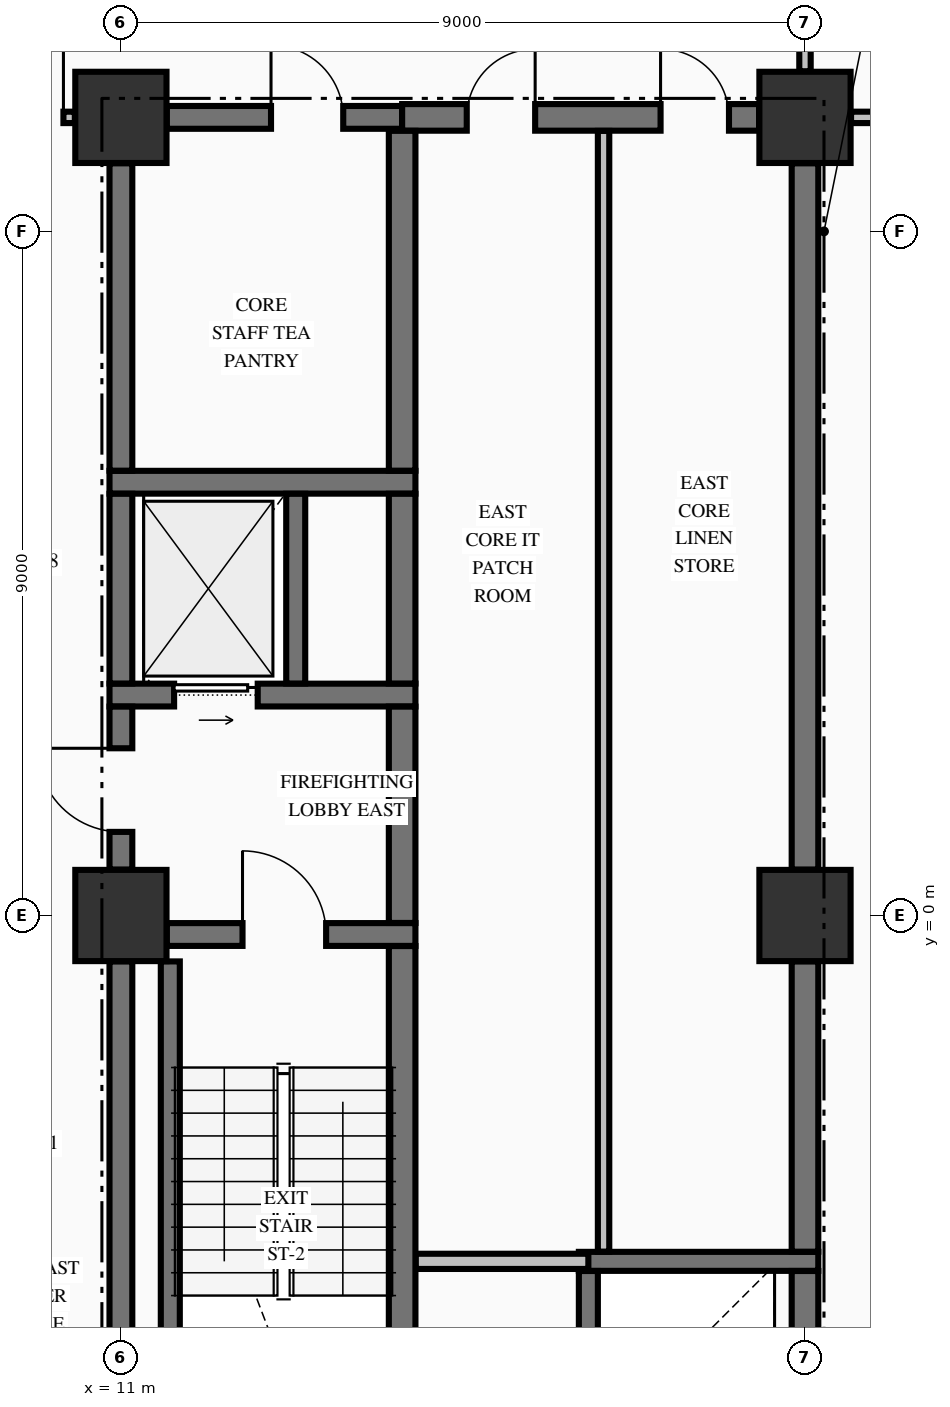
"""IFC4 building model, lengths in metres.
Left out: names, types, materials, properties, quantities, classifications, styles, units other than length and angle.
Written with IfcOpenShell. Run it as: python <this file> out.ifc"""

import sys

from ifc_helpers import new_model, si_unit, direction, frame, frame_2d, origin, origin_2d, place, context, subcontext, project, spatial, rectangle, extrude, element, fill, save


model = new_model("IFC4")
c1 = context("Model", 3, precision=1e-05, world=origin(), true_north=direction((0.0, 1.0)))
c2 = subcontext(c1, "Body", "Model", "MODEL_VIEW")
j1 = project(units=[si_unit("LENGTHUNIT", "METRE"), si_unit("PLANEANGLEUNIT", "RADIAN")], contexts=[c1])
p1 = place(None, origin())
s1 = spatial("IfcSite", under=j1, at=p1, CompositionType="ELEMENT")
p2 = place(p1, origin())
s2 = spatial("IfcBuilding", under=s1, at=p2, CompositionType="ELEMENT")
p3 = place(p2, frame((0.0, 0.0, 64.33)))
s3 = spatial("IfcBuildingStorey", under=s2, at=p3, CompositionType="ELEMENT", Elevation=64.33)
for number, where, z_axis, x_axis in (
    (1, (11.0, 0.0, -0.25), (0.0, 0.0, 1.0), (1.0, 0.0, 0.0)),
    (2, (11.0, 10.5, -0.25), (0.0, 0.0, 1.0), (1.0, 0.0, 0.0)),
    (3, (20.0, 10.5, -0.25), (0.0, 0.0, 1.0), (1.0, 0.0, 0.0)),
    (4, (20.0, 0.0, -0.25), (0.0, 0.0, 1.0), (1.0, 0.0, 0.0)),
):
    element("IfcColumn", number, at=place(p3, frame(where, z_axis=z_axis, x_axis=x_axis)), inside=s3, PredefinedType="COLUMN", context=c2, shape_type="SweptSolid", body=[
        extrude(rectangle(XDim=1.2, YDim=1.2, at=origin_2d()), origin(), (0.0, 0.0, 1.0), 3.57),
    ])
p4 = place(p3, frame((17.025, -4.55, 0.0), z_axis=(0.0, 0.0, 1.0), x_axis=(1.0, 0.0, 0.0)))
e5 = element("IfcWall", 5, at=p4, inside=s3, PredefinedType="SOLIDWALL", context=c2, shape_type="SweptSolid", body=[
    extrude(rectangle(XDim=3.15, YDim=0.25, at=frame_2d((1.575, 0.0))), origin(), (0.0, 0.0, 1.0), 3.32),
])
p5 = place(p3, frame((11.604, -0.25, 0.0), z_axis=(0.0, 0.0, 1.0), x_axis=(1.0, 0.0, 0.0)))
e6 = element("IfcWall", 6, at=p5, inside=s3, PredefinedType="SHEAR", context=c2, shape_type="SweptSolid", body=[
    extrude(rectangle(XDim=3.271, YDim=0.3, at=frame_2d((1.635, 0.0))), origin(), (0.0, 0.0, 1.0), 3.32),
])
p6 = place(p5, frame((0.996, 0.0, 0.0)))
e7 = element("IfcOpeningElement", 7, at=p6, cuts=e6, PredefinedType="OPENING", context=c2, shape_type="SweptSolid", body=[
    extrude(rectangle(XDim=1.1, YDim=2.15, at=frame_2d((0.55, 1.075))), frame((0.0, 0.16, 0.0), z_axis=(0.0, -1.0, 0.0), x_axis=(1.0, 0.0, 0.0)), (0.0, 0.0, 1.0), 0.32),
])
p7 = place(p3, frame((10.85, 2.9, 0.0), z_axis=(0.0, 0.0, 1.0), x_axis=(1.0, 0.0, 0.0)))
e8 = element("IfcWall", 8, at=p7, inside=s3, PredefinedType="SHEAR", context=c2, shape_type="SweptSolid", body=[
    extrude(rectangle(XDim=4.025, YDim=0.3, at=frame_2d((2.012, 0.0))), origin(), (0.0, 0.0, 1.0), 3.32),
])
p8 = place(p7, frame((0.85, 0.0, 0.0)))
e9 = element("IfcOpeningElement", 9, at=p8, cuts=e8, PredefinedType="OPENING", context=c2, shape_type="SweptSolid", body=[
    extrude(rectangle(XDim=1.1, YDim=2.2, at=frame_2d((0.55, 1.1))), frame((0.0, 0.16, 0.0), z_axis=(0.0, -1.0, 0.0), x_axis=(1.0, 0.0, 0.0)), (0.0, 0.0, 1.0), 0.32),
])
p9 = place(p3, frame((10.85, 5.7, 0.0), z_axis=(0.0, 0.0, 1.0), x_axis=(1.0, 0.0, 0.0)))
e10 = element("IfcWall", 10, at=p9, inside=s3, PredefinedType="SHEAR", context=c2, shape_type="SweptSolid", body=[
    extrude(rectangle(XDim=4.025, YDim=0.3, at=frame_2d((2.012, 0.0))), origin(), (0.0, 0.0, 1.0), 3.32),
])
p10 = place(p3, frame((11.604, 10.5, 0.0), z_axis=(0.0, 0.0, 1.0), x_axis=(1.0, 0.0, 0.0)))
e11 = element("IfcWall", 11, at=p10, inside=s3, PredefinedType="SHEAR", context=c2, shape_type="SweptSolid", body=[
    extrude(rectangle(XDim=3.096, YDim=0.3, at=frame_2d((1.548, 0.0))), origin(), (0.0, 0.0, 1.0), 3.32),
])
p11 = place(p10, frame((1.371, 0.0, 0.0)))
e12 = element("IfcOpeningElement", 12, at=p11, cuts=e11, PredefinedType="OPENING", context=c2, shape_type="SweptSolid", body=[
    extrude(rectangle(XDim=0.95, YDim=2.15, at=frame_2d((0.475, 1.075))), frame((0.0, 0.16, 0.0), z_axis=(0.0, -1.0, 0.0), x_axis=(1.0, 0.0, 0.0)), (0.0, 0.0, 1.0), 0.32),
])
p12 = place(p3, frame((14.7, 10.5, 0.0), z_axis=(0.0, 0.0, 1.0), x_axis=(1.0, 0.0, 0.0)))
e13 = element("IfcWall", 13, at=p12, inside=s3, PredefinedType="SHEAR", context=c2, shape_type="SweptSolid", body=[
    extrude(rectangle(XDim=4.696, YDim=0.35, at=frame_2d((2.348, 0.0))), origin(), (0.0, 0.0, 1.0), 3.32),
])
p13 = place(p12, frame((0.85, 0.0, 0.0)))
e14 = element("IfcOpeningElement", 14, at=p13, cuts=e13, PredefinedType="OPENING", context=c2, shape_type="SweptSolid", body=[
    extrude(rectangle(XDim=0.9, YDim=2.15, at=frame_2d((0.45, 1.075))), frame((0.0, 0.185, 0.0), z_axis=(0.0, -1.0, 0.0), x_axis=(1.0, 0.0, 0.0)), (0.0, 0.0, 1.0), 0.37),
])
p14 = place(p12, frame((3.4, 0.0, 0.0)))
e15 = element("IfcOpeningElement", 15, at=p14, cuts=e13, PredefinedType="OPENING", context=c2, shape_type="SweptSolid", body=[
    extrude(rectangle(XDim=0.9, YDim=2.15, at=frame_2d((0.45, 1.075))), frame((0.0, 0.185, 0.0), z_axis=(0.0, -1.0, 0.0), x_axis=(1.0, 0.0, 0.0)), (0.0, 0.0, 1.0), 0.37),
])
p15 = place(p3, frame((14.878, -4.55, 0.0), z_axis=(0.0, 0.0, 1.0), x_axis=(1.0, 0.0, 0.0)))
e16 = element("IfcWall", 16, at=p15, inside=s3, PredefinedType="PARTITIONING", context=c2, shape_type="SweptSolid", body=[
    extrude(rectangle(XDim=2.272, YDim=0.2, at=frame_2d((1.136, 0.0))), origin(), (0.0, 0.0, 1.0), 3.32),
])
p16 = place(p3, frame((-10.394, 10.5, 0.0), z_axis=(0.0, 0.0, 1.0), x_axis=(1.0, 0.0, 0.0)))
e17 = element("IfcWall", 17, at=p16, inside=s3, PredefinedType="PARTITIONING", context=c2, shape_type="SweptSolid", body=[
    extrude(rectangle(XDim=20.788, YDim=0.15, at=frame_2d((10.394, 0.0))), origin(), (0.0, 0.0, 1.0), 3.32),
])
p17 = place(p16, frame((0.15, 0.0, 0.0)))
e18 = element("IfcOpeningElement", 18, at=p17, cuts=e17, PredefinedType="OPENING", context=c2, shape_type="SweptSolid", body=[
    extrude(rectangle(XDim=1.05, YDim=2.15, at=frame_2d((0.525, 1.075))), frame((0.0, 0.085, 0.0), z_axis=(0.0, -1.0, 0.0), x_axis=(1.0, 0.0, 0.0)), (0.0, 0.0, 1.0), 0.17),
])
p18 = place(p16, frame((19.588, 0.0, 0.0)))
e19 = element("IfcOpeningElement", 19, at=p18, cuts=e17, PredefinedType="OPENING", context=c2, shape_type="SweptSolid", body=[
    extrude(rectangle(XDim=1.05, YDim=2.15, at=frame_2d((0.525, 1.075))), frame((0.0, 0.085, 0.0), z_axis=(0.0, -1.0, 0.0), x_axis=(1.0, 0.0, 0.0)), (0.0, 0.0, 1.0), 0.17),
])
p19 = place(p3, frame((20.606, 10.5, 0.0), z_axis=(0.0, 0.0, 1.0), x_axis=(1.0, 0.0, 0.0)))
e20 = element("IfcWall", 20, at=p19, inside=s3, PredefinedType="PARTITIONING", context=c2, shape_type="SweptSolid", body=[
    extrude(rectangle(XDim=3.229, YDim=0.15, at=frame_2d((1.615, 0.0))), origin(), (0.0, 0.0, 1.0), 3.32),
])
p20 = place(p19, frame((0.894, 0.0, 0.0)))
e21 = element("IfcOpeningElement", 21, at=p20, cuts=e20, PredefinedType="OPENING", context=c2, shape_type="SweptSolid", body=[
    extrude(rectangle(XDim=1.0, YDim=2.15, at=frame_2d((0.5, 1.075))), frame((0.0, 0.085, 0.0), z_axis=(0.0, -1.0, 0.0), x_axis=(1.0, 0.0, 0.0)), (0.0, 0.0, 1.0), 0.17),
])
p21 = place(p3, frame((11.0, -9.346, 0.0), z_axis=(0.0, 0.0, 1.0), x_axis=(0.0, 1.0, 0.0)))
e22 = element("IfcWall", 22, at=p21, inside=s3, PredefinedType="SHEAR", context=c2, shape_type="SweptSolid", body=[
    extrude(rectangle(XDim=8.742, YDim=0.3, at=frame_2d((4.371, 0.0))), origin(), (0.0, 0.0, 1.0), 3.32),
])
p22 = place(p3, frame((11.0, 0.604, 0.0), z_axis=(0.0, 0.0, 1.0), x_axis=(0.0, 1.0, 0.0)))
e23 = element("IfcWall", 23, at=p22, inside=s3, PredefinedType="SHEAR", context=c2, shape_type="SweptSolid", body=[
    extrude(rectangle(XDim=2.144, YDim=0.3, at=frame_2d((1.072, 0.0))), origin(), (0.0, 0.0, 1.0), 3.32),
])
p23 = place(p22, frame((0.496, 0.0, 0.0)))
e24 = element("IfcOpeningElement", 24, at=p23, cuts=e23, PredefinedType="OPENING", context=c2, shape_type="SweptSolid", body=[
    extrude(rectangle(XDim=1.1, YDim=2.15, at=frame_2d((0.55, 1.075))), frame((0.0, 0.16, 0.0), z_axis=(0.0, -1.0, 0.0), x_axis=(1.0, 0.0, 0.0)), (0.0, 0.0, 1.0), 0.32),
])
p24 = place(p3, frame((11.0, 3.052, 0.0), z_axis=(0.0, 0.0, 1.0), x_axis=(0.0, 1.0, 0.0)))
e25 = element("IfcWall", 25, at=p24, inside=s3, PredefinedType="SHEAR", context=c2, shape_type="SweptSolid", body=[
    extrude(rectangle(XDim=2.496, YDim=0.3, at=frame_2d((1.248, 0.0))), origin(), (0.0, 0.0, 1.0), 3.32),
])
p25 = place(p3, frame((11.0, 5.852, 0.0), z_axis=(0.0, 0.0, 1.0), x_axis=(0.0, 1.0, 0.0)))
e26 = element("IfcWall", 26, at=p25, inside=s3, PredefinedType="SHEAR", context=c2, shape_type="SweptSolid", body=[
    extrude(rectangle(XDim=4.044, YDim=0.3, at=frame_2d((2.022, 0.0))), origin(), (0.0, 0.0, 1.0), 3.32),
])
p26 = place(p3, frame((11.65, -9.346, 0.0), z_axis=(0.0, 0.0, 1.0), x_axis=(0.0, 1.0, 0.0)))
e27 = element("IfcWall", 27, at=p26, inside=s3, PredefinedType="SOLIDWALL", context=c2, shape_type="SweptSolid", body=[
    extrude(rectangle(XDim=8.742, YDim=0.25, at=frame_2d((4.371, 0.0))), origin(), (0.0, 0.0, 1.0), 3.32),
])
p27 = place(p3, frame((13.3, 3.052, 0.0), z_axis=(0.0, 0.0, 1.0), x_axis=(0.0, 1.0, 0.0)))
e28 = element("IfcWall", 28, at=p27, inside=s3, PredefinedType="SOLIDWALL", context=c2, shape_type="SweptSolid", body=[
    extrude(rectangle(XDim=2.496, YDim=0.25, at=frame_2d((1.248, 0.0))), origin(), (0.0, 0.0, 1.0), 3.32),
])
p28 = place(p3, frame((14.7, -9.773, 0.0), z_axis=(0.0, 0.0, 1.0), x_axis=(0.0, 1.0, 0.0)))
e29 = element("IfcWall", 29, at=p28, inside=s3, PredefinedType="SHEAR", context=c2, shape_type="SweptSolid", body=[
    extrude(rectangle(XDim=9.371, YDim=0.35, at=frame_2d((4.686, 0.0))), origin(), (0.0, 0.0, 1.0), 3.32),
])
p29 = place(p3, frame((14.7, -0.098, 0.0), z_axis=(0.0, 0.0, 1.0), x_axis=(0.0, 1.0, 0.0)))
e30 = element("IfcWall", 30, at=p29, inside=s3, PredefinedType="SHEAR", context=c2, shape_type="SweptSolid", body=[
    extrude(rectangle(XDim=2.846, YDim=0.35, at=frame_2d((1.423, 0.0))), origin(), (0.0, 0.0, 1.0), 3.32),
])
p30 = place(p3, frame((14.7, 3.052, 0.0), z_axis=(0.0, 0.0, 1.0), x_axis=(0.0, 1.0, 0.0)))
e31 = element("IfcWall", 31, at=p30, inside=s3, PredefinedType="SHEAR", context=c2, shape_type="SweptSolid", body=[
    extrude(rectangle(XDim=2.496, YDim=0.35, at=frame_2d((1.248, 0.0))), origin(), (0.0, 0.0, 1.0), 3.32),
])
p31 = place(p3, frame((14.7, 5.852, 0.0), z_axis=(0.0, 0.0, 1.0), x_axis=(0.0, 1.0, 0.0)))
e32 = element("IfcWall", 32, at=p31, inside=s3, PredefinedType="SHEAR", context=c2, shape_type="SweptSolid", body=[
    extrude(rectangle(XDim=4.471, YDim=0.35, at=frame_2d((2.235, 0.0))), origin(), (0.0, 0.0, 1.0), 3.32),
])
p32 = place(p3, frame((17.15, -6.923, 0.0), z_axis=(0.0, 0.0, 1.0), x_axis=(0.0, 1.0, 0.0)))
e33 = element("IfcWall", 33, at=p32, inside=s3, PredefinedType="SOLIDWALL", context=c2, shape_type="SweptSolid", body=[
    extrude(rectangle(XDim=2.246, YDim=0.25, at=frame_2d((1.123, 0.0))), origin(), (0.0, 0.0, 1.0), 3.32),
])
p33 = place(p3, frame((20.0, -6.923, 0.0), z_axis=(0.0, 0.0, 1.0), x_axis=(0.0, 1.0, 0.0)))
e34 = element("IfcWall", 34, at=p33, inside=s3, PredefinedType="SHEAR", context=c2, shape_type="SweptSolid", body=[
    extrude(rectangle(XDim=2.246, YDim=0.35, at=frame_2d((1.123, 0.0))), origin(), (0.0, 0.0, 1.0), 3.32),
])
p34 = place(p3, frame((20.0, -4.423, 0.0), z_axis=(0.0, 0.0, 1.0), x_axis=(0.0, 1.0, 0.0)))
e35 = element("IfcWall", 35, at=p34, inside=s3, PredefinedType="SHEAR", context=c2, shape_type="SweptSolid", body=[
    extrude(rectangle(XDim=3.819, YDim=0.35, at=frame_2d((1.91, 0.0))), origin(), (0.0, 0.0, 1.0), 3.32),
])
p35 = place(p3, frame((20.0, 0.604, 0.0), z_axis=(0.0, 0.0, 1.0), x_axis=(0.0, 1.0, 0.0)))
e36 = element("IfcWall", 36, at=p35, inside=s3, PredefinedType="SHEAR", context=c2, shape_type="SweptSolid", body=[
    extrude(rectangle(XDim=9.292, YDim=0.35, at=frame_2d((4.646, 0.0))), origin(), (0.0, 0.0, 1.0), 3.32),
])
p36 = place(p3, frame((17.35, -4.422, 0.0), z_axis=(0.0, 0.0, 1.0), x_axis=(0.0, 1.0, 0.0)))
e37 = element("IfcWall", 37, at=p36, inside=s3, PredefinedType="PARTITIONING", context=c2, shape_type="SweptSolid", body=[
    extrude(rectangle(XDim=14.744, YDim=0.15, at=frame_2d((7.372, 0.0))), origin(), (0.0, 0.0, 1.0), 3.32),
])
p37 = place(p3, frame((20.0, 11.106, 0.0), z_axis=(0.0, 0.0, 1.0), x_axis=(0.0, 1.0, 0.0)))
e38 = element("IfcWall", 38, at=p37, inside=s3, PredefinedType="PARTITIONING", context=c2, shape_type="SweptSolid", body=[
    extrude(rectangle(XDim=2.166, YDim=0.15, at=frame_2d((1.083, 0.0))), origin(), (0.0, 0.0, 1.0), 3.32),
])
p38 = place(p37, frame((0.349, 0.0, 0.0)))
e39 = element("IfcOpeningElement", 39, at=p38, cuts=e38, PredefinedType="OPENING", context=c2, shape_type="SweptSolid", body=[
    extrude(rectangle(XDim=0.95, YDim=2.15, at=frame_2d((0.475, 1.075))), frame((0.0, 0.085, 0.0), z_axis=(0.0, -1.0, 0.0), x_axis=(1.0, 0.0, 0.0)), (0.0, 0.0, 1.0), 0.17),
])
p39 = place(p6, origin())
e40 = element("IfcDoor", 40, at=p39, inside=s3, OperationType="SINGLE_SWING_LEFT", PredefinedType="DOOR", context=c2, shape_type="SweptSolid", body=[
    extrude(rectangle(XDim=1.1, YDim=2.15, at=frame_2d((0.55, 1.075))), frame((0.0, 0.025, 0.0), z_axis=(0.0, -1.0, 0.0), x_axis=(1.0, 0.0, 0.0)), (0.0, 0.0, 1.0), 0.05),
])
fill(e7, e40)
p40 = place(p23, origin())
e41 = element("IfcDoor", 41, at=p40, inside=s3, OperationType="SINGLE_SWING_RIGHT", PredefinedType="DOOR", context=c2, shape_type="SweptSolid", body=[
    extrude(rectangle(XDim=1.1, YDim=2.15, at=frame_2d((0.55, 1.075))), frame((0.0, 0.025, 0.0), z_axis=(0.0, -1.0, 0.0), x_axis=(1.0, 0.0, 0.0)), (0.0, 0.0, 1.0), 0.05),
])
fill(e24, e41)
p41 = place(p8, origin())
e42 = element("IfcDoor", 42, at=p41, inside=s3, OperationType="SLIDING_TO_RIGHT", PredefinedType="DOOR", context=c2, shape_type="SweptSolid", body=[
    extrude(rectangle(XDim=1.1, YDim=2.2, at=frame_2d((0.55, 1.1))), frame((0.0, 0.025, 0.0), z_axis=(0.0, -1.0, 0.0), x_axis=(1.0, 0.0, 0.0)), (0.0, 0.0, 1.0), 0.05),
])
fill(e9, e42)
p42 = place(p11, origin())
e43 = element("IfcDoor", 43, at=p42, inside=s3, OperationType="SINGLE_SWING_LEFT", PredefinedType="DOOR", context=c2, shape_type="SweptSolid", body=[
    extrude(rectangle(XDim=0.95, YDim=2.15, at=frame_2d((0.475, 1.075))), frame((0.0, 0.025, 0.0), z_axis=(0.0, -1.0, 0.0), x_axis=(1.0, 0.0, 0.0)), (0.0, 0.0, 1.0), 0.05),
])
fill(e12, e43)
p43 = place(p13, origin())
e44 = element("IfcDoor", 44, at=p43, inside=s3, OperationType="SINGLE_SWING_RIGHT", PredefinedType="DOOR", context=c2, shape_type="SweptSolid", body=[
    extrude(rectangle(XDim=0.9, YDim=2.15, at=frame_2d((0.45, 1.075))), frame((0.0, 0.025, 0.0), z_axis=(0.0, -1.0, 0.0), x_axis=(1.0, 0.0, 0.0)), (0.0, 0.0, 1.0), 0.05),
])
fill(e14, e44)
p44 = place(p14, origin())
e45 = element("IfcDoor", 45, at=p44, inside=s3, OperationType="SINGLE_SWING_LEFT", PredefinedType="DOOR", context=c2, shape_type="SweptSolid", body=[
    extrude(rectangle(XDim=0.9, YDim=2.15, at=frame_2d((0.45, 1.075))), frame((0.0, 0.025, 0.0), z_axis=(0.0, -1.0, 0.0), x_axis=(1.0, 0.0, 0.0)), (0.0, 0.0, 1.0), 0.05),
])
fill(e15, e45)
p45 = place(p18, origin())
e46 = element("IfcDoor", 46, at=p45, inside=s3, OperationType="SINGLE_SWING_RIGHT", PredefinedType="DOOR", context=c2, shape_type="SweptSolid", body=[
    extrude(rectangle(XDim=1.05, YDim=2.15, at=frame_2d((0.525, 1.075))), frame((0.0, 0.025, 0.0), z_axis=(0.0, -1.0, 0.0), x_axis=(1.0, 0.0, 0.0)), (0.0, 0.0, 1.0), 0.05),
])
fill(e19, e46)
save(model, sys.argv[1])
